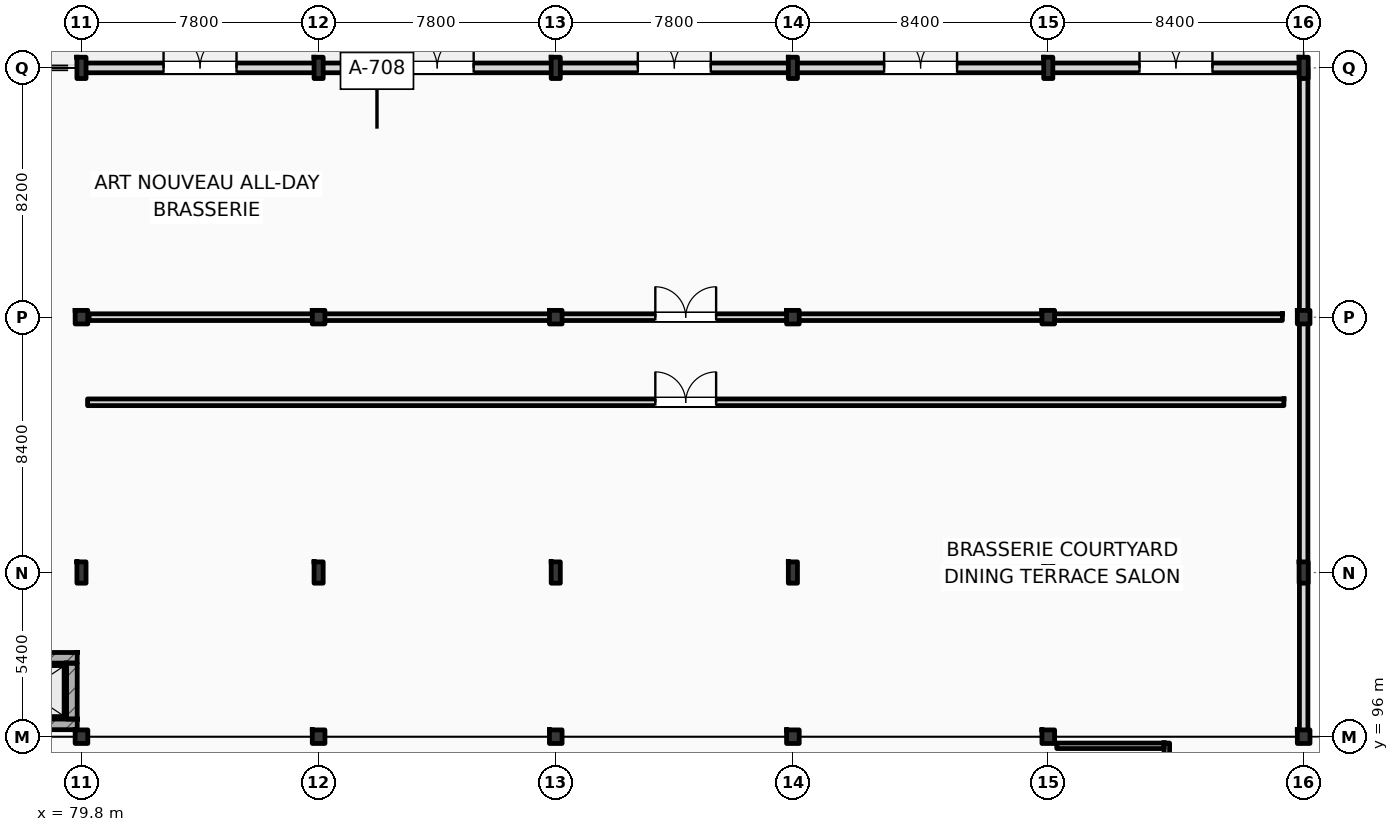
"""IFC4 building model, lengths in metres.
Left out: names, types, materials, properties, quantities, classifications, styles, units other than length and angle.
Written with IfcOpenShell. Run it as: python <this file> out.ifc"""

import sys

from ifc_helpers import new_model, si_unit, direction, frame, frame_2d, origin, origin_2d, place, context, subcontext, project, spatial, rectangle, i_section, extrude, element, fill, save


model = new_model("IFC4")
c1 = context("Model", 3, precision=1e-05, world=origin(), true_north=direction((0.0, 1.0)))
c2 = subcontext(c1, "Body", "Model", "MODEL_VIEW")
j1 = project(units=[si_unit("LENGTHUNIT", "METRE"), si_unit("PLANEANGLEUNIT", "RADIAN")], contexts=[c1])
p1 = place(None, origin())
s1 = spatial("IfcSite", under=j1, at=p1, CompositionType="ELEMENT")
p2 = place(p1, origin())
s2 = spatial("IfcBuilding", under=s1, at=p2, CompositionType="ELEMENT")
p3 = place(p2, origin())
s3 = spatial("IfcBuildingStorey", under=s2, at=p3, CompositionType="ELEMENT", Elevation=0.0)
p4 = place(p3, frame((79.8, 96.0, 0.0), z_axis=(0.0, 0.0, 1.0), x_axis=(1.0, 0.0, 0.0)))
e1 = element("IfcColumn", 1, at=p4, inside=s3, PredefinedType="COLUMN", context=c2, shape_type="SweptSolid", body=[
    extrude(i_section(OverallWidth=0.416, OverallDepth=0.446, WebThickness=0.036, FlangeThickness=0.048, FilletRadius=0.015, at=origin_2d()), origin(), (0.0, 0.0, 1.0), 6.0),
])
p5 = place(p3, frame((79.8, 101.4, 0.0), z_axis=(0.0, 0.0, 1.0), x_axis=(1.0, 0.0, 0.0)))
e2 = element("IfcColumn", 2, at=p5, inside=s3, PredefinedType="COLUMN", context=c2, shape_type="SweptSolid", body=[
    extrude(i_section(OverallWidth=0.3, OverallDepth=0.7, WebThickness=0.017, FlangeThickness=0.032, FilletRadius=0.027, at=origin_2d()), origin(), (0.0, 0.0, 1.0), 6.0),
])
p6 = place(p3, frame((79.8, 109.8, 0.0), z_axis=(0.0, 0.0, 1.0), x_axis=(1.0, 0.0, 0.0)))
e3 = element("IfcColumn", 3, at=p6, inside=s3, PredefinedType="COLUMN", context=c2, shape_type="SweptSolid", body=[
    extrude(i_section(OverallWidth=0.416, OverallDepth=0.446, WebThickness=0.036, FlangeThickness=0.048, FilletRadius=0.015, at=origin_2d()), origin(), (0.0, 0.0, 1.0), 6.0),
])
p7 = place(p3, frame((79.8, 118.0, 0.0), z_axis=(0.0, 0.0, 1.0), x_axis=(1.0, 0.0, 0.0)))
e4 = element("IfcColumn", 4, at=p7, inside=s3, PredefinedType="COLUMN", context=c2, shape_type="SweptSolid", body=[
    extrude(i_section(OverallWidth=0.3, OverallDepth=0.7, WebThickness=0.017, FlangeThickness=0.032, FilletRadius=0.027, at=origin_2d()), origin(), (0.0, 0.0, 1.0), 6.0),
])
p8 = place(p3, frame((87.6, 96.0, 0.0), z_axis=(0.0, 0.0, 1.0), x_axis=(1.0, 0.0, 0.0)))
e5 = element("IfcColumn", 5, at=p8, inside=s3, PredefinedType="COLUMN", context=c2, shape_type="SweptSolid", body=[
    extrude(i_section(OverallWidth=0.416, OverallDepth=0.446, WebThickness=0.036, FlangeThickness=0.048, FilletRadius=0.015, at=origin_2d()), origin(), (0.0, 0.0, 1.0), 6.0),
])
p9 = place(p3, frame((87.6, 101.4, 0.0), z_axis=(0.0, 0.0, 1.0), x_axis=(1.0, 0.0, 0.0)))
e6 = element("IfcColumn", 6, at=p9, inside=s3, PredefinedType="COLUMN", context=c2, shape_type="SweptSolid", body=[
    extrude(i_section(OverallWidth=0.3, OverallDepth=0.7, WebThickness=0.017, FlangeThickness=0.032, FilletRadius=0.027, at=origin_2d()), origin(), (0.0, 0.0, 1.0), 6.0),
])
p10 = place(p3, frame((87.6, 109.8, 0.0), z_axis=(0.0, 0.0, 1.0), x_axis=(1.0, 0.0, 0.0)))
e7 = element("IfcColumn", 7, at=p10, inside=s3, PredefinedType="COLUMN", context=c2, shape_type="SweptSolid", body=[
    extrude(i_section(OverallWidth=0.416, OverallDepth=0.446, WebThickness=0.036, FlangeThickness=0.048, FilletRadius=0.015, at=origin_2d()), origin(), (0.0, 0.0, 1.0), 6.0),
])
p11 = place(p3, frame((87.6, 118.0, 0.0), z_axis=(0.0, 0.0, 1.0), x_axis=(1.0, 0.0, 0.0)))
e8 = element("IfcColumn", 8, at=p11, inside=s3, PredefinedType="COLUMN", context=c2, shape_type="SweptSolid", body=[
    extrude(i_section(OverallWidth=0.3, OverallDepth=0.7, WebThickness=0.017, FlangeThickness=0.032, FilletRadius=0.027, at=origin_2d()), origin(), (0.0, 0.0, 1.0), 6.0),
])
p12 = place(p3, frame((95.4, 96.0, 0.0), z_axis=(0.0, 0.0, 1.0), x_axis=(1.0, 0.0, 0.0)))
e9 = element("IfcColumn", 9, at=p12, inside=s3, PredefinedType="COLUMN", context=c2, shape_type="SweptSolid", body=[
    extrude(i_section(OverallWidth=0.416, OverallDepth=0.446, WebThickness=0.036, FlangeThickness=0.048, FilletRadius=0.015, at=origin_2d()), origin(), (0.0, 0.0, 1.0), 6.0),
])
p13 = place(p3, frame((95.4, 101.4, 0.0), z_axis=(0.0, 0.0, 1.0), x_axis=(1.0, 0.0, 0.0)))
e10 = element("IfcColumn", 10, at=p13, inside=s3, PredefinedType="COLUMN", context=c2, shape_type="SweptSolid", body=[
    extrude(i_section(OverallWidth=0.3, OverallDepth=0.7, WebThickness=0.017, FlangeThickness=0.032, FilletRadius=0.027, at=origin_2d()), origin(), (0.0, 0.0, 1.0), 6.0),
])
p14 = place(p3, frame((95.4, 109.8, 0.0), z_axis=(0.0, 0.0, 1.0), x_axis=(1.0, 0.0, 0.0)))
e11 = element("IfcColumn", 11, at=p14, inside=s3, PredefinedType="COLUMN", context=c2, shape_type="SweptSolid", body=[
    extrude(i_section(OverallWidth=0.416, OverallDepth=0.446, WebThickness=0.036, FlangeThickness=0.048, FilletRadius=0.015, at=origin_2d()), origin(), (0.0, 0.0, 1.0), 6.0),
])
p15 = place(p3, frame((95.4, 118.0, 0.0), z_axis=(0.0, 0.0, 1.0), x_axis=(1.0, 0.0, 0.0)))
e12 = element("IfcColumn", 12, at=p15, inside=s3, PredefinedType="COLUMN", context=c2, shape_type="SweptSolid", body=[
    extrude(i_section(OverallWidth=0.3, OverallDepth=0.7, WebThickness=0.017, FlangeThickness=0.032, FilletRadius=0.027, at=origin_2d()), origin(), (0.0, 0.0, 1.0), 6.0),
])
p16 = place(p3, frame((103.2, 96.0, 0.0), z_axis=(0.0, 0.0, 1.0), x_axis=(1.0, 0.0, 0.0)))
e13 = element("IfcColumn", 13, at=p16, inside=s3, PredefinedType="COLUMN", context=c2, shape_type="SweptSolid", body=[
    extrude(i_section(OverallWidth=0.416, OverallDepth=0.446, WebThickness=0.036, FlangeThickness=0.048, FilletRadius=0.015, at=origin_2d()), origin(), (0.0, 0.0, 1.0), 6.0),
])
p17 = place(p3, frame((103.2, 101.4, 0.0), z_axis=(0.0, 0.0, 1.0), x_axis=(1.0, 0.0, 0.0)))
e14 = element("IfcColumn", 14, at=p17, inside=s3, PredefinedType="COLUMN", context=c2, shape_type="SweptSolid", body=[
    extrude(i_section(OverallWidth=0.3, OverallDepth=0.7, WebThickness=0.017, FlangeThickness=0.032, FilletRadius=0.027, at=origin_2d()), origin(), (0.0, 0.0, 1.0), 6.0),
])
p18 = place(p3, frame((103.2, 109.8, 0.0), z_axis=(0.0, 0.0, 1.0), x_axis=(1.0, 0.0, 0.0)))
e15 = element("IfcColumn", 15, at=p18, inside=s3, PredefinedType="COLUMN", context=c2, shape_type="SweptSolid", body=[
    extrude(i_section(OverallWidth=0.416, OverallDepth=0.446, WebThickness=0.036, FlangeThickness=0.048, FilletRadius=0.015, at=origin_2d()), origin(), (0.0, 0.0, 1.0), 6.0),
])
p19 = place(p3, frame((103.2, 118.0, 0.0), z_axis=(0.0, 0.0, 1.0), x_axis=(1.0, 0.0, 0.0)))
e16 = element("IfcColumn", 16, at=p19, inside=s3, PredefinedType="COLUMN", context=c2, shape_type="SweptSolid", body=[
    extrude(i_section(OverallWidth=0.3, OverallDepth=0.7, WebThickness=0.017, FlangeThickness=0.032, FilletRadius=0.027, at=origin_2d()), origin(), (0.0, 0.0, 1.0), 6.0),
])
p20 = place(p3, frame((111.6, 96.0, 0.0), z_axis=(0.0, 0.0, 1.0), x_axis=(1.0, 0.0, 0.0)))
e17 = element("IfcColumn", 17, at=p20, inside=s3, PredefinedType="COLUMN", context=c2, shape_type="SweptSolid", body=[
    extrude(i_section(OverallWidth=0.416, OverallDepth=0.446, WebThickness=0.036, FlangeThickness=0.048, FilletRadius=0.015, at=origin_2d()), origin(), (0.0, 0.0, 1.0), 6.0),
])
p21 = place(p3, frame((111.6, 101.4, 0.0), z_axis=(0.0, 0.0, 1.0), x_axis=(1.0, 0.0, 0.0)))
e18 = element("IfcColumn", 18, at=p21, inside=s3, PredefinedType="COLUMN", context=c2, shape_type="SweptSolid", body=[
    extrude(i_section(OverallWidth=0.3, OverallDepth=0.7, WebThickness=0.017, FlangeThickness=0.032, FilletRadius=0.027, at=origin_2d()), origin(), (0.0, 0.0, 1.0), 6.0),
])
p22 = place(p3, frame((111.6, 109.8, 0.0), z_axis=(0.0, 0.0, 1.0), x_axis=(1.0, 0.0, 0.0)))
e19 = element("IfcColumn", 19, at=p22, inside=s3, PredefinedType="COLUMN", context=c2, shape_type="SweptSolid", body=[
    extrude(i_section(OverallWidth=0.416, OverallDepth=0.446, WebThickness=0.036, FlangeThickness=0.048, FilletRadius=0.015, at=origin_2d()), origin(), (0.0, 0.0, 1.0), 6.0),
])
p23 = place(p3, frame((111.6, 118.0, 0.0), z_axis=(0.0, 0.0, 1.0), x_axis=(1.0, 0.0, 0.0)))
e20 = element("IfcColumn", 20, at=p23, inside=s3, PredefinedType="COLUMN", context=c2, shape_type="SweptSolid", body=[
    extrude(i_section(OverallWidth=0.3, OverallDepth=0.7, WebThickness=0.017, FlangeThickness=0.032, FilletRadius=0.027, at=origin_2d()), origin(), (0.0, 0.0, 1.0), 6.0),
])
p24 = place(p3, frame((120.0, 96.0, 0.0), z_axis=(0.0, 0.0, 1.0), x_axis=(1.0, 0.0, 0.0)))
e21 = element("IfcColumn", 21, at=p24, inside=s3, PredefinedType="COLUMN", context=c2, shape_type="SweptSolid", body=[
    extrude(i_section(OverallWidth=0.416, OverallDepth=0.446, WebThickness=0.036, FlangeThickness=0.048, FilletRadius=0.015, at=origin_2d()), origin(), (0.0, 0.0, 1.0), 6.0),
])
p25 = place(p3, frame((120.0, 101.4, 0.0), z_axis=(0.0, 0.0, 1.0), x_axis=(1.0, 0.0, 0.0)))
e22 = element("IfcColumn", 22, at=p25, inside=s3, PredefinedType="COLUMN", context=c2, shape_type="SweptSolid", body=[
    extrude(i_section(OverallWidth=0.3, OverallDepth=0.7, WebThickness=0.017, FlangeThickness=0.032, FilletRadius=0.027, at=origin_2d()), origin(), (0.0, 0.0, 1.0), 6.0),
])
p26 = place(p3, frame((120.0, 109.8, 0.0), z_axis=(0.0, 0.0, 1.0), x_axis=(1.0, 0.0, 0.0)))
e23 = element("IfcColumn", 23, at=p26, inside=s3, PredefinedType="COLUMN", context=c2, shape_type="SweptSolid", body=[
    extrude(i_section(OverallWidth=0.416, OverallDepth=0.446, WebThickness=0.036, FlangeThickness=0.048, FilletRadius=0.015, at=origin_2d()), origin(), (0.0, 0.0, 1.0), 6.0),
])
p27 = place(p3, frame((120.0, 118.0, 0.0), z_axis=(0.0, 0.0, 1.0), x_axis=(1.0, 0.0, 0.0)))
e24 = element("IfcColumn", 24, at=p27, inside=s3, PredefinedType="COLUMN", context=c2, shape_type="SweptSolid", body=[
    extrude(i_section(OverallWidth=0.3, OverallDepth=0.7, WebThickness=0.017, FlangeThickness=0.032, FilletRadius=0.027, at=origin_2d()), origin(), (0.0, 0.0, 1.0), 6.0),
])
p28 = place(p3, frame((79.8, 118.0, 0.0), z_axis=(0.0, 0.0, 1.0), x_axis=(1.0, 0.0, 0.0)))
e25 = element("IfcWall", 25, at=p28, inside=s3, PredefinedType="STANDARD", context=c2, shape_type="SweptSolid", body=[
    extrude(rectangle(XDim=7.8, YDim=0.32, at=frame_2d((3.9, 0.0))), origin(), (0.0, 0.0, 1.0), 5.19),
])
p29 = place(p28, frame((2.7, 0.0, 0.0)))
e26 = element("IfcOpeningElement", 26, at=p29, cuts=e25, PredefinedType="OPENING", context=c2, shape_type="SweptSolid", body=[
    extrude(rectangle(XDim=2.4, YDim=2.6, at=frame_2d((1.2, 1.3))), frame((0.0, 0.17, 0.0), z_axis=(0.0, -1.0, 0.0), x_axis=(1.0, 0.0, 0.0)), (0.0, 0.0, 1.0), 0.34),
])
p30 = place(p3, frame((87.6, 118.0, 0.0), z_axis=(0.0, 0.0, 1.0), x_axis=(1.0, 0.0, 0.0)))
e27 = element("IfcWall", 27, at=p30, inside=s3, PredefinedType="STANDARD", context=c2, shape_type="SweptSolid", body=[
    extrude(rectangle(XDim=7.8, YDim=0.32, at=frame_2d((3.9, 0.0))), origin(), (0.0, 0.0, 1.0), 5.19),
])
p31 = place(p30, frame((2.7, 0.0, 0.0)))
e28 = element("IfcOpeningElement", 28, at=p31, cuts=e27, PredefinedType="OPENING", context=c2, shape_type="SweptSolid", body=[
    extrude(rectangle(XDim=2.4, YDim=2.45, at=frame_2d((1.2, 1.225))), frame((0.0, 0.17, 0.0), z_axis=(0.0, -1.0, 0.0), x_axis=(1.0, 0.0, 0.0)), (0.0, 0.0, 1.0), 0.34),
])
p32 = place(p3, frame((95.4, 118.0, 0.0), z_axis=(0.0, 0.0, 1.0), x_axis=(1.0, 0.0, 0.0)))
e29 = element("IfcWall", 29, at=p32, inside=s3, PredefinedType="STANDARD", context=c2, shape_type="SweptSolid", body=[
    extrude(rectangle(XDim=7.8, YDim=0.32, at=frame_2d((3.9, 0.0))), origin(), (0.0, 0.0, 1.0), 5.19),
])
p33 = place(p32, frame((2.7, 0.0, 0.0)))
e30 = element("IfcOpeningElement", 30, at=p33, cuts=e29, PredefinedType="OPENING", context=c2, shape_type="SweptSolid", body=[
    extrude(rectangle(XDim=2.4, YDim=2.6, at=frame_2d((1.2, 1.3))), frame((0.0, 0.17, 0.0), z_axis=(0.0, -1.0, 0.0), x_axis=(1.0, 0.0, 0.0)), (0.0, 0.0, 1.0), 0.34),
])
p34 = place(p3, frame((103.2, 118.0, 0.0), z_axis=(0.0, 0.0, 1.0), x_axis=(1.0, 0.0, 0.0)))
e31 = element("IfcWall", 31, at=p34, inside=s3, PredefinedType="STANDARD", context=c2, shape_type="SweptSolid", body=[
    extrude(rectangle(XDim=8.4, YDim=0.32, at=frame_2d((4.2, 0.0))), origin(), (0.0, 0.0, 1.0), 5.14),
])
p35 = place(p34, frame((3.0, 0.0, 0.0)))
e32 = element("IfcOpeningElement", 32, at=p35, cuts=e31, PredefinedType="OPENING", context=c2, shape_type="SweptSolid", body=[
    extrude(rectangle(XDim=2.4, YDim=2.6, at=frame_2d((1.2, 1.3))), frame((0.0, 0.17, 0.0), z_axis=(0.0, -1.0, 0.0), x_axis=(1.0, 0.0, 0.0)), (0.0, 0.0, 1.0), 0.34),
])
p36 = place(p3, frame((111.6, 118.0, 0.0), z_axis=(0.0, 0.0, 1.0), x_axis=(1.0, 0.0, 0.0)))
e33 = element("IfcWall", 33, at=p36, inside=s3, PredefinedType="STANDARD", context=c2, shape_type="SweptSolid", body=[
    extrude(rectangle(XDim=8.4, YDim=0.32, at=frame_2d((4.2, 0.0))), origin(), (0.0, 0.0, 1.0), 5.14),
])
p37 = place(p36, frame((3.0, 0.0, 0.0)))
e34 = element("IfcOpeningElement", 34, at=p37, cuts=e33, PredefinedType="OPENING", context=c2, shape_type="SweptSolid", body=[
    extrude(rectangle(XDim=2.4, YDim=2.6, at=frame_2d((1.2, 1.3))), frame((0.0, 0.17, 0.0), z_axis=(0.0, -1.0, 0.0), x_axis=(1.0, 0.0, 0.0)), (0.0, 0.0, 1.0), 0.34),
])
p38 = place(p3, frame((120.0, 96.0, 0.0), z_axis=(0.0, 0.0, 1.0), x_axis=(0.0, 1.0, 0.0)))
e35 = element("IfcWall", 35, at=p38, inside=s3, PredefinedType="STANDARD", context=c2, shape_type="SweptSolid", body=[
    extrude(rectangle(XDim=22.0, YDim=0.28, at=frame_2d((11.0, 0.0))), origin(), (0.0, 0.0, 1.0), 5.24),
])
p39 = place(p3, frame((76.67, 98.595, 0.0), z_axis=(0.0, 0.0, 1.0), x_axis=(1.0, 0.0, 0.0)))
e36 = element("IfcWall", 36, at=p39, inside=s3, PredefinedType="SHEAR", context=c2, shape_type="SweptSolid", body=[
    extrude(rectangle(XDim=2.99, YDim=0.35, at=frame_2d((1.495, 0.0))), origin(), (0.0, 0.0, 1.0), 5.7),
])
p40 = place(p39, frame((0.695, 0.0, 0.0)))
e37 = element("IfcOpeningElement", 37, at=p40, cuts=e36, PredefinedType="OPENING", context=c2, shape_type="SweptSolid", body=[
    extrude(rectangle(XDim=1.25, YDim=2.25, at=frame_2d((0.625, 1.125))), frame((0.0, 0.185, 0.0), z_axis=(0.0, -1.0, 0.0), x_axis=(1.0, 0.0, 0.0)), (0.0, 0.0, 1.0), 0.37),
])
p41 = place(p3, frame((76.67, 96.405, 0.0), z_axis=(0.0, 0.0, 1.0), x_axis=(1.0, 0.0, 0.0)))
e38 = element("IfcWall", 38, at=p41, inside=s3, PredefinedType="SHEAR", context=c2, shape_type="SweptSolid", body=[
    extrude(rectangle(XDim=2.99, YDim=0.35, at=frame_2d((1.495, 0.0))), origin(), (0.0, 0.0, 1.0), 5.7),
])
p42 = place(p3, frame((79.485, 96.58, 0.0), z_axis=(0.0, 0.0, 1.0), x_axis=(0.0, 1.0, 0.0)))
e39 = element("IfcWall", 39, at=p42, inside=s3, PredefinedType="SHEAR", context=c2, shape_type="SweptSolid", body=[
    extrude(rectangle(XDim=1.84, YDim=0.35, at=frame_2d((0.92, 0.0))), origin(), (0.0, 0.0, 1.0), 5.24),
])
p43 = place(p3, frame((80.05, 109.8, 0.0), z_axis=(0.0, 0.0, 1.0), x_axis=(1.0, 0.0, 0.0)))
e40 = element("IfcWall", 40, at=p43, inside=s3, PredefinedType="PARTITIONING", context=c2, shape_type="SweptSolid", body=[
    extrude(rectangle(XDim=39.25, YDim=0.22, at=frame_2d((19.625, 0.0))), origin(), (0.0, 0.0, 1.0), 5.14),
])
p44 = place(p43, frame((18.625, 0.0, 0.0)))
e41 = element("IfcOpeningElement", 41, at=p44, cuts=e40, PredefinedType="OPENING", context=c2, shape_type="SweptSolid", body=[
    extrude(rectangle(XDim=2.0, YDim=2.35, at=frame_2d((1.0, 1.175))), frame((0.0, 0.12, 0.0), z_axis=(0.0, -1.0, 0.0), x_axis=(1.0, 0.0, 0.0)), (0.0, 0.0, 1.0), 0.24),
])
p45 = place(p3, frame((80.0, 107.0, 0.0), z_axis=(0.0, 0.0, 1.0), x_axis=(1.0, 0.0, 0.0)))
e42 = element("IfcWall", 42, at=p45, inside=s3, PredefinedType="PARTITIONING", context=c2, shape_type="SweptSolid", body=[
    extrude(rectangle(XDim=39.35, YDim=0.22, at=frame_2d((19.675, 0.0))), origin(), (0.0, 0.0, 1.0), 5.7),
])
p46 = place(p45, frame((18.675, 0.0, 0.0)))
e43 = element("IfcOpeningElement", 43, at=p46, cuts=e42, PredefinedType="OPENING", context=c2, shape_type="SweptSolid", body=[
    extrude(rectangle(XDim=2.0, YDim=2.35, at=frame_2d((1.0, 1.175))), frame((0.0, 0.12, 0.0), z_axis=(0.0, -1.0, 0.0), x_axis=(1.0, 0.0, 0.0)), (0.0, 0.0, 1.0), 0.24),
])
p47 = place(p3, frame((115.5, 87.81, 0.0), z_axis=(0.0, 0.0, 1.0), x_axis=(0.0, 1.0, 0.0)))
e44 = element("IfcWall", 44, at=p47, inside=s3, PredefinedType="PARTITIONING", context=c2, shape_type="SweptSolid", body=[
    extrude(rectangle(XDim=7.98, YDim=0.18, at=frame_2d((3.99, 0.0))), origin(), (0.0, 0.0, 1.0), 5.7),
])
p48 = place(p3, frame((111.88, 95.7, 0.0), z_axis=(0.0, 0.0, 1.0), x_axis=(1.0, 0.0, 0.0)))
e45 = element("IfcWall", 45, at=p48, inside=s3, PredefinedType="PARTITIONING", context=c2, shape_type="SweptSolid", body=[
    extrude(rectangle(XDim=3.53, YDim=0.18, at=frame_2d((1.765, 0.0))), origin(), (0.0, 0.0, 1.0), 5.7),
])
p49 = place(p29, origin())
e46 = element("IfcDoor", 46, at=p49, inside=s3, OperationType="DOUBLE_SWING_LEFT", PredefinedType="DOOR", context=c2, shape_type="SweptSolid", body=[
    extrude(rectangle(XDim=2.4, YDim=2.6, at=frame_2d((1.2, 1.3))), frame((0.0, 0.025, 0.0), z_axis=(0.0, -1.0, 0.0), x_axis=(1.0, 0.0, 0.0)), (0.0, 0.0, 1.0), 0.05),
])
fill(e26, e46)
p50 = place(p31, origin())
e47 = element("IfcDoor", 47, at=p50, inside=s3, OperationType="DOUBLE_SWING_LEFT", PredefinedType="DOOR", context=c2, shape_type="SweptSolid", body=[
    extrude(rectangle(XDim=2.4, YDim=2.45, at=frame_2d((1.2, 1.225))), frame((0.0, 0.025, 0.0), z_axis=(0.0, -1.0, 0.0), x_axis=(1.0, 0.0, 0.0)), (0.0, 0.0, 1.0), 0.05),
])
fill(e28, e47)
p51 = place(p33, origin())
e48 = element("IfcDoor", 48, at=p51, inside=s3, OperationType="DOUBLE_SWING_LEFT", PredefinedType="DOOR", context=c2, shape_type="SweptSolid", body=[
    extrude(rectangle(XDim=2.4, YDim=2.6, at=frame_2d((1.2, 1.3))), frame((0.0, 0.025, 0.0), z_axis=(0.0, -1.0, 0.0), x_axis=(1.0, 0.0, 0.0)), (0.0, 0.0, 1.0), 0.05),
])
fill(e30, e48)
p52 = place(p35, origin())
e49 = element("IfcDoor", 49, at=p52, inside=s3, OperationType="DOUBLE_SWING_LEFT", PredefinedType="DOOR", context=c2, shape_type="SweptSolid", body=[
    extrude(rectangle(XDim=2.4, YDim=2.6, at=frame_2d((1.2, 1.3))), frame((0.0, 0.025, 0.0), z_axis=(0.0, -1.0, 0.0), x_axis=(1.0, 0.0, 0.0)), (0.0, 0.0, 1.0), 0.05),
])
fill(e32, e49)
p53 = place(p37, origin())
e50 = element("IfcDoor", 50, at=p53, inside=s3, OperationType="DOUBLE_SWING_LEFT", PredefinedType="DOOR", context=c2, shape_type="SweptSolid", body=[
    extrude(rectangle(XDim=2.4, YDim=2.6, at=frame_2d((1.2, 1.3))), frame((0.0, 0.025, 0.0), z_axis=(0.0, -1.0, 0.0), x_axis=(1.0, 0.0, 0.0)), (0.0, 0.0, 1.0), 0.05),
])
fill(e34, e50)
p54 = place(p44, origin())
e51 = element("IfcDoor", 51, at=p54, inside=s3, OperationType="DOUBLE_SWING_LEFT", PredefinedType="DOOR", context=c2, shape_type="SweptSolid", body=[
    extrude(rectangle(XDim=2.0, YDim=2.35, at=frame_2d((1.0, 1.175))), frame((0.0, 0.025, 0.0), z_axis=(0.0, -1.0, 0.0), x_axis=(1.0, 0.0, 0.0)), (0.0, 0.0, 1.0), 0.05),
])
fill(e41, e51)
p55 = place(p46, origin())
e52 = element("IfcDoor", 52, at=p55, inside=s3, OperationType="DOUBLE_SWING_LEFT", PredefinedType="DOOR", context=c2, shape_type="SweptSolid", body=[
    extrude(rectangle(XDim=2.0, YDim=2.35, at=frame_2d((1.0, 1.175))), frame((0.0, 0.025, 0.0), z_axis=(0.0, -1.0, 0.0), x_axis=(1.0, 0.0, 0.0)), (0.0, 0.0, 1.0), 0.05),
])
fill(e43, e52)
save(model, sys.argv[1])
